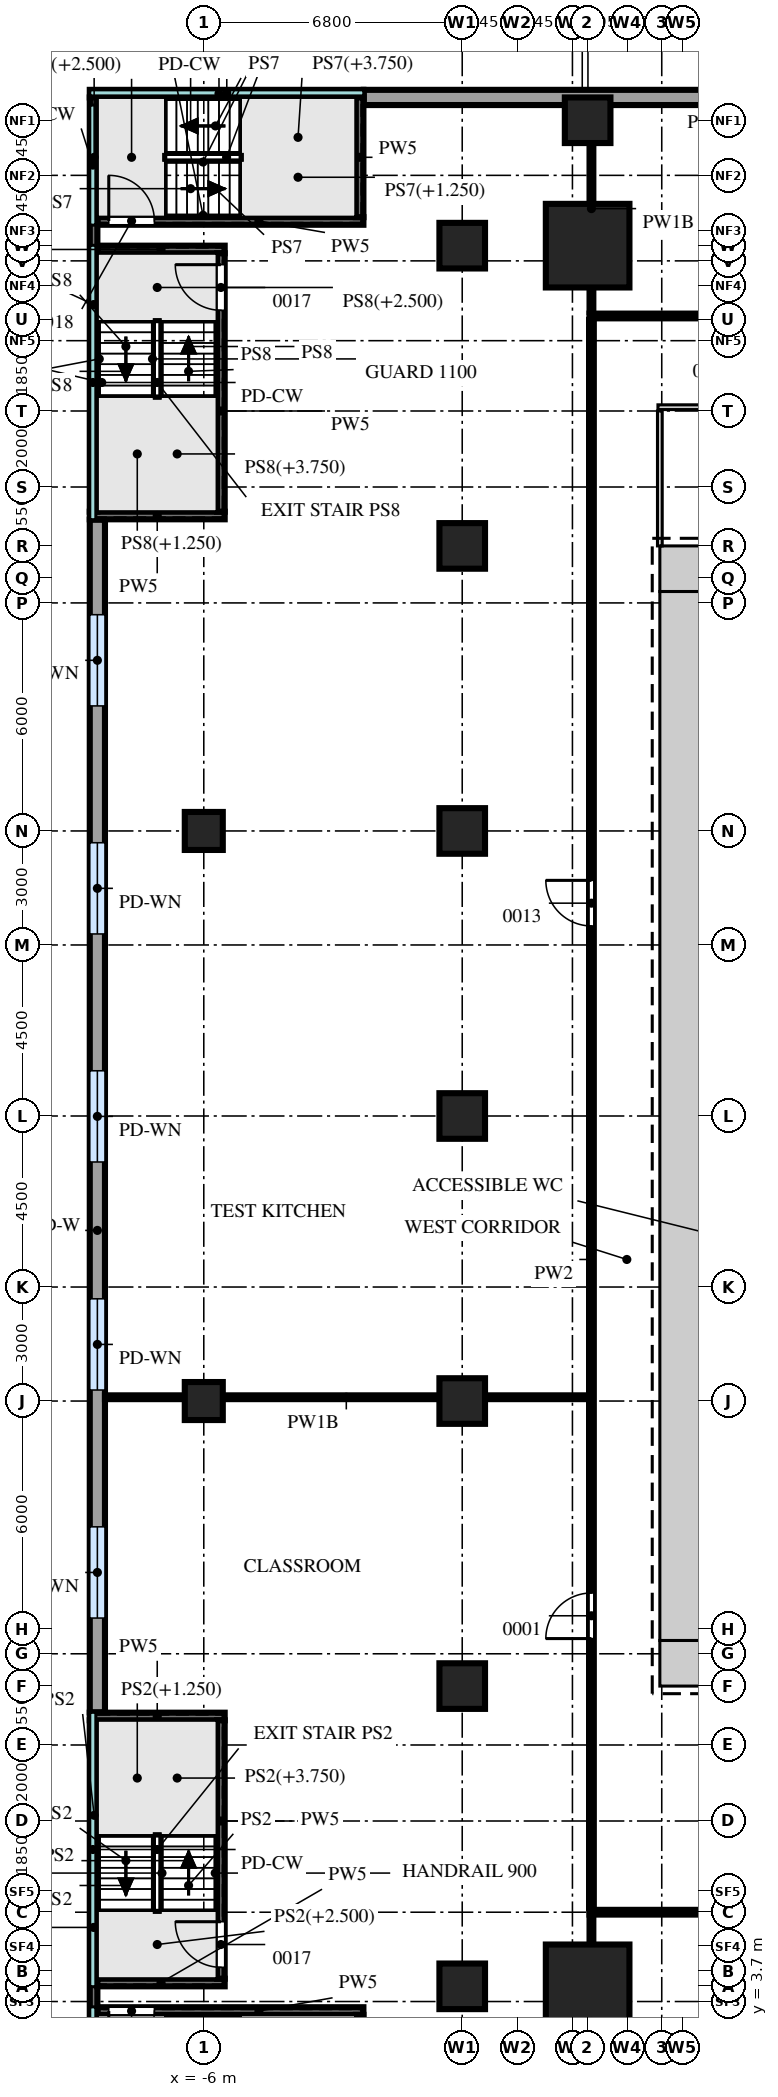
"""IFC4 building model, lengths in metres.
Left out: names, types, materials, properties, quantities, classifications, styles, units other than length and angle.
Written with IfcOpenShell. Run it as: python <this file> out.ifc"""

import sys

from ifc_helpers import new_model, si_unit, direction, frame, frame_2d, origin, origin_2d, place, context, subcontext, project, spatial, rectangle, extrude, source, transform, mapped, element, fill, save


model = new_model("IFC4")
c1 = context("Model", 3, precision=1e-05, world=origin(), true_north=direction((0.0, 1.0)))
c2 = subcontext(c1, "Body", "Model", "MODEL_VIEW")
j1 = project(units=[si_unit("LENGTHUNIT", "METRE"), si_unit("PLANEANGLEUNIT", "RADIAN")], contexts=[c1])
p1 = place(None, origin())
s1 = spatial("IfcSite", under=j1, at=p1, CompositionType="ELEMENT")
p2 = place(p1, origin())
s2 = spatial("IfcBuilding", under=s1, at=p2, CompositionType="ELEMENT")
p3 = place(p2, frame((0.0, 0.0, 23.5)))
s3 = spatial("IfcBuildingStorey", under=s2, at=p3, CompositionType="ELEMENT", Elevation=23.5)
m1 = source(origin(), c2, "Body", "SweptSolid", [
    extrude(rectangle(XDim=1.2, YDim=1.2, at=frame_2d((0.6, 0.0))), origin(), (0.0, 0.0, 1.0), 4.7),
])
for number, where, z_axis, x_axis in (
    (1, (6.0, 41.4, 0.0), (0.0, 0.0, 1.0), (1.0, 0.0, 0.0)),
    (2, (6.0, 12.6, 0.0), (0.0, 0.0, 1.0), (1.0, 0.0, 0.0)),
):
    element("IfcWall", number, at=place(p3, frame(where, z_axis=z_axis, x_axis=x_axis)), inside=s3, PredefinedType="SHEAR", context=c2, shape_type="MappedRepresentation", body=[
        mapped(m1, transform((0.0, 0.0, 0.0))),
    ])
m2 = source(origin(), c2, "Body", "SweptSolid", [
    extrude(rectangle(XDim=27.6, YDim=1.2, at=frame_2d((13.8, 0.0))), origin(), (0.0, 0.0, 1.0), 4.7),
])
p4 = place(p3, frame((6.6, 13.2, 0.0), z_axis=(0.0, 0.0, 1.0), x_axis=(0.0, 1.0, 0.0)))
e3 = element("IfcWall", 3, at=p4, inside=s3, PredefinedType="SHEAR", context=c2, shape_type="MappedRepresentation", body=[
    mapped(m2, transform((0.0, 0.0, 0.0))),
])
m3 = source(origin(), c2, "Body", "SweptSolid", [
    extrude(rectangle(XDim=2.2, YDim=2.2, at=origin_2d()), origin(), (0.0, 0.0, 1.0), 4.7),
])
for number, where, z_axis, x_axis in (
    (4, (4.1, 49.9, 0.0), (0.0, 0.0, 1.0), (1.0, 0.0, 0.0)),
    (5, (4.1, 4.1, 0.0), (0.0, 0.0, 1.0), (1.0, 0.0, 0.0)),
):
    element("IfcColumn", number, at=place(p3, frame(where, z_axis=z_axis, x_axis=x_axis)), inside=s3, PredefinedType="COLUMN", context=c2, shape_type="MappedRepresentation", body=[
        mapped(m3, transform((0.0, 0.0, 0.0))),
    ])
m4 = source(origin(), c2, "Body", "SweptSolid", [
    extrude(rectangle(XDim=1.2, YDim=1.2, at=origin_2d()), origin(), (0.0, 0.0, 1.0), 4.7),
])
for number, where, z_axis, x_axis in (
    (6, (4.1, 53.2, 0.0), (0.0, 0.0, 1.0), (1.0, 0.0, 0.0)),
    (7, (0.8, 4.1, 0.0), (0.0, 0.0, 1.0), (1.0, 0.0, 0.0)),
    (8, (0.8, 12.0, 0.0), (0.0, 0.0, 1.0), (1.0, 0.0, 0.0)),
    (9, (0.8, 19.5, 0.0), (0.0, 0.0, 1.0), (1.0, 0.0, 0.0)),
    (10, (0.8, 27.0, 0.0), (0.0, 0.0, 1.0), (1.0, 0.0, 0.0)),
    (11, (0.8, 34.5, 0.0), (0.0, 0.0, 1.0), (1.0, 0.0, 0.0)),
    (12, (0.8, 42.0, 0.0), (0.0, 0.0, 1.0), (1.0, 0.0, 0.0)),
    (13, (0.8, 49.9, 0.0), (0.0, 0.0, 1.0), (1.0, 0.0, 0.0)),
):
    element("IfcColumn", number, at=place(p3, frame(where, z_axis=z_axis, x_axis=x_axis)), inside=s3, PredefinedType="COLUMN", context=c2, shape_type="MappedRepresentation", body=[
        mapped(m4, transform((0.0, 0.0, 0.0))),
    ])
m5 = source(origin(), c2, "Body", "SweptSolid", [
    extrude(rectangle(XDim=1.0, YDim=1.0, at=origin_2d()), origin(), (0.0, 0.0, 1.0), 4.7),
])
for number, where, z_axis, x_axis in (
    (14, (-6.0, 19.5, 0.0), (0.0, 0.0, 1.0), (1.0, 0.0, 0.0)),
    (15, (-6.0, 34.5, 0.0), (0.0, 0.0, 1.0), (1.0, 0.0, 0.0)),
):
    element("IfcColumn", number, at=place(p3, frame(where, z_axis=z_axis, x_axis=x_axis)), inside=s3, PredefinedType="COLUMN", context=c2, shape_type="MappedRepresentation", body=[
        mapped(m5, transform((0.0, 0.0, 0.0))),
    ])
m6 = source(origin(), c2, "Body", "SweptSolid", [
    extrude(rectangle(XDim=31.38, YDim=0.4, at=frame_2d((15.69, 0.0))), origin(), (0.0, 0.0, 1.0), 4.7),
])
p5 = place(p3, frame((-8.8, 42.69, 0.0), z_axis=(0.0, 0.0, 1.0), x_axis=(0.0, -1.0, 0.0)))
e16 = element("IfcWall", 16, at=p5, inside=s3, PredefinedType="SOLIDWALL", context=c2, shape_type="MappedRepresentation", body=[
    mapped(m6, transform((0.0, 0.0, 0.0))),
])
m7 = source(origin(), c2, "Body", "SweptSolid", [
    extrude(rectangle(XDim=2.4, YDim=2.4, at=frame_2d((1.2, 1.2))), frame((0.0, 0.21, 0.0), z_axis=(0.0, -1.0, 0.0), x_axis=(1.0, 0.0, 0.0)), (0.0, 0.0, 1.0), 0.42),
])
p6 = place(p5, frame((2.5, 0.0, 1.0)))
e17 = element("IfcOpeningElement", 17, at=p6, cuts=e16, PredefinedType="OPENING", context=c2, shape_type="MappedRepresentation", body=[
    mapped(m7, transform((0.0, 0.0, 0.0))),
])
p7 = place(p5, frame((8.5, 0.0, 1.0)))
e18 = element("IfcOpeningElement", 18, at=p7, cuts=e16, PredefinedType="OPENING", context=c2, shape_type="MappedRepresentation", body=[
    mapped(m7, transform((0.0, 0.0, 0.0))),
])
p8 = place(p5, frame((14.5, 0.0, 1.0)))
e19 = element("IfcOpeningElement", 19, at=p8, cuts=e16, PredefinedType="OPENING", context=c2, shape_type="MappedRepresentation", body=[
    mapped(m7, transform((0.0, 0.0, 0.0))),
])
p9 = place(p5, frame((20.5, 0.0, 1.0)))
e20 = element("IfcOpeningElement", 20, at=p9, cuts=e16, PredefinedType="OPENING", context=c2, shape_type="MappedRepresentation", body=[
    mapped(m7, transform((0.0, 0.0, 0.0))),
])
p10 = place(p5, frame((26.5, 0.0, 1.0)))
e21 = element("IfcOpeningElement", 21, at=p10, cuts=e16, PredefinedType="OPENING", context=c2, shape_type="MappedRepresentation", body=[
    mapped(m7, transform((0.0, 0.0, 0.0))),
])
m8 = source(origin(), c2, "Body", "SweptSolid", [
    extrude(rectangle(XDim=32.64, YDim=0.4, at=frame_2d((16.32, 0.0))), origin(), (0.0, 0.0, 1.0), 4.7),
])
p11 = place(p3, frame((30.85, 53.8, 0.0), z_axis=(0.0, 0.0, 1.0), x_axis=(-1.0, 0.0, 0.0)))
e22 = element("IfcWall", 22, at=p11, inside=s3, PredefinedType="SOLIDWALL", context=c2, shape_type="MappedRepresentation", body=[
    mapped(m8, transform((0.0, 0.0, 0.0))),
])
p12 = place(p11, frame((15.1, 0.0, 1.0)))
e23 = element("IfcOpeningElement", 23, at=p12, cuts=e22, PredefinedType="OPENING", context=c2, shape_type="MappedRepresentation", body=[
    mapped(m7, transform((0.0, 0.0, 0.0))),
])
p13 = place(p11, frame((21.1, 0.0, 1.0)))
e24 = element("IfcOpeningElement", 24, at=p13, cuts=e22, PredefinedType="OPENING", context=c2, shape_type="MappedRepresentation", body=[
    mapped(m7, transform((0.0, 0.0, 0.0))),
])
m9 = source(origin(), c2, "Body", "SweptSolid", [
    extrude(rectangle(XDim=7.0, YDim=0.2, at=frame_2d((3.5, 0.0))), origin(), (0.0, 0.0, 1.0), 4.7),
])
p14 = place(p3, frame((-8.8, 3.45, 0.0), z_axis=(0.0, 0.0, 1.0), x_axis=(1.0, 0.0, 0.0)))
e25 = element("IfcWall", 25, at=p14, inside=s3, PredefinedType="PARTITIONING", context=c2, shape_type="MappedRepresentation", body=[
    mapped(m9, transform((0.0, 0.0, 0.0))),
])
m10 = source(origin(), c2, "Body", "SweptSolid", [
    extrude(rectangle(XDim=1.2, YDim=2.1, at=frame_2d((0.6, 1.05))), frame((0.0, 0.11, 0.0), z_axis=(0.0, -1.0, 0.0), x_axis=(1.0, 0.0, 0.0)), (0.0, 0.0, 1.0), 0.22),
])
p15 = place(p14, frame((0.3, 0.0, 0.0)))
e26 = element("IfcOpeningElement", 26, at=p15, cuts=e25, PredefinedType="OPENING", context=c2, shape_type="MappedRepresentation", body=[
    mapped(m10, transform((0.0, 0.0, 0.0))),
])
m11 = source(origin(), c2, "Body", "SweptSolid", [
    extrude(rectangle(XDim=10.9, YDim=0.2, at=frame_2d((5.45, 0.0))), origin(), (0.0, 0.0, 1.0), 4.7),
])
p16 = place(p3, frame((-8.9, 0.2, 0.0), z_axis=(0.0, 0.0, 1.0), x_axis=(0.0, 1.0, 0.0)))
e27 = element("IfcWall", 27, at=p16, inside=s3, PredefinedType="PARTITIONING", context=c2, shape_type="MappedRepresentation", body=[
    mapped(m11, transform((0.0, 0.0, 0.0))),
])
m12 = source(origin(), c2, "Body", "SweptSolid", [
    extrude(rectangle(XDim=3.15, YDim=0.2, at=frame_2d((1.575, 0.0))), origin(), (0.0, 0.0, 1.0), 4.7),
])
p17 = place(p3, frame((-1.9, 0.2, 0.0), z_axis=(0.0, 0.0, 1.0), x_axis=(0.0, 1.0, 0.0)))
e28 = element("IfcWall", 28, at=p17, inside=s3, PredefinedType="PARTITIONING", context=c2, shape_type="MappedRepresentation", body=[
    mapped(m12, transform((0.0, 0.0, 0.0))),
])
m13 = source(origin(), c2, "Body", "SweptSolid", [
    extrude(rectangle(XDim=3.35, YDim=0.2, at=frame_2d((1.675, 0.0))), origin(), (0.0, 0.0, 1.0), 4.7),
])
p18 = place(p3, frame((-8.8, 4.2, 0.0), z_axis=(0.0, 0.0, 1.0), x_axis=(1.0, 0.0, 0.0)))
e29 = element("IfcWall", 29, at=p18, inside=s3, PredefinedType="PARTITIONING", context=c2, shape_type="MappedRepresentation", body=[
    mapped(m13, transform((0.0, 0.0, 0.0))),
])
m14 = source(origin(), c2, "Body", "SweptSolid", [
    extrude(rectangle(XDim=3.55, YDim=0.2, at=frame_2d((1.775, 0.0))), origin(), (0.0, 0.0, 1.0), 4.7),
])
p19 = place(p3, frame((-9.0, 11.2, 0.0), z_axis=(0.0, 0.0, 1.0), x_axis=(1.0, 0.0, 0.0)))
e30 = element("IfcWall", 30, at=p19, inside=s3, PredefinedType="PARTITIONING", context=c2, shape_type="MappedRepresentation", body=[
    mapped(m14, transform((0.0, 0.0, 0.0))),
])
m15 = source(origin(), c2, "Body", "SweptSolid", [
    extrude(rectangle(XDim=6.8, YDim=0.2, at=frame_2d((3.4, 0.0))), origin(), (0.0, 0.0, 1.0), 4.7),
])
p20 = place(p3, frame((-5.55, 4.3, 0.0), z_axis=(0.0, 0.0, 1.0), x_axis=(0.0, 1.0, 0.0)))
e31 = element("IfcWall", 31, at=p20, inside=s3, PredefinedType="PARTITIONING", context=c2, shape_type="MappedRepresentation", body=[
    mapped(m15, transform((0.0, 0.0, 0.0))),
])
p21 = place(p20, frame((0.3, 0.0, 0.0)))
e32 = element("IfcOpeningElement", 32, at=p21, cuts=e31, PredefinedType="OPENING", context=c2, shape_type="MappedRepresentation", body=[
    mapped(m10, transform((0.0, 0.0, 0.0))),
])
p22 = place(p3, frame((-8.8, 50.55, 0.0), z_axis=(0.0, 0.0, 1.0), x_axis=(1.0, 0.0, 0.0)))
e33 = element("IfcWall", 33, at=p22, inside=s3, PredefinedType="PARTITIONING", context=c2, shape_type="MappedRepresentation", body=[
    mapped(m9, transform((0.0, 0.0, 0.0))),
])
p23 = place(p22, frame((0.3, 0.0, 0.0)))
e34 = element("IfcOpeningElement", 34, at=p23, cuts=e33, PredefinedType="OPENING", context=c2, shape_type="MappedRepresentation", body=[
    mapped(m10, transform((0.0, 0.0, 0.0))),
])
m16 = source(origin(), c2, "Body", "SweptSolid", [
    extrude(rectangle(XDim=7.2, YDim=0.2, at=frame_2d((3.6, 0.0))), origin(), (0.0, 0.0, 1.0), 4.7),
])
p24 = place(p3, frame((-9.0, 53.9, 0.0), z_axis=(0.0, 0.0, 1.0), x_axis=(1.0, 0.0, 0.0)))
e35 = element("IfcWall", 35, at=p24, inside=s3, PredefinedType="PARTITIONING", context=c2, shape_type="MappedRepresentation", body=[
    mapped(m16, transform((0.0, 0.0, 0.0))),
])
p25 = place(p3, frame((-1.9, 50.65, 0.0), z_axis=(0.0, 0.0, 1.0), x_axis=(0.0, 1.0, 0.0)))
e36 = element("IfcWall", 36, at=p25, inside=s3, PredefinedType="PARTITIONING", context=c2, shape_type="MappedRepresentation", body=[
    mapped(m12, transform((0.0, 0.0, 0.0))),
])
p26 = place(p3, frame((-9.0, 42.8, 0.0), z_axis=(0.0, 0.0, 1.0), x_axis=(1.0, 0.0, 0.0)))
e37 = element("IfcWall", 37, at=p26, inside=s3, PredefinedType="PARTITIONING", context=c2, shape_type="MappedRepresentation", body=[
    mapped(m14, transform((0.0, 0.0, 0.0))),
])
p27 = place(p3, frame((-8.8, 49.8, 0.0), z_axis=(0.0, 0.0, 1.0), x_axis=(1.0, 0.0, 0.0)))
e38 = element("IfcWall", 38, at=p27, inside=s3, PredefinedType="PARTITIONING", context=c2, shape_type="MappedRepresentation", body=[
    mapped(m13, transform((0.0, 0.0, 0.0))),
])
p28 = place(p3, frame((-8.9, 42.9, 0.0), z_axis=(0.0, 0.0, 1.0), x_axis=(0.0, 1.0, 0.0)))
e39 = element("IfcWall", 39, at=p28, inside=s3, PredefinedType="PARTITIONING", context=c2, shape_type="MappedRepresentation", body=[
    mapped(m11, transform((0.0, 0.0, 0.0))),
])
p29 = place(p3, frame((-5.55, 42.9, 0.0), z_axis=(0.0, 0.0, 1.0), x_axis=(0.0, 1.0, 0.0)))
e40 = element("IfcWall", 40, at=p29, inside=s3, PredefinedType="PARTITIONING", context=c2, shape_type="MappedRepresentation", body=[
    mapped(m15, transform((0.0, 0.0, 0.0))),
])
p30 = place(p29, frame((5.3, 0.0, 0.0)))
e41 = element("IfcOpeningElement", 41, at=p30, cuts=e40, PredefinedType="OPENING", context=c2, shape_type="MappedRepresentation", body=[
    mapped(m10, transform((0.0, 0.0, 0.0))),
])
m17 = source(origin(), c2, "Body", "SweptSolid", [
    extrude(rectangle(XDim=5.55, YDim=0.1, at=frame_2d((2.775, 0.0))), origin(), (0.0, 0.0, 1.0), 4.7),
])
p31 = place(p3, frame((4.2, 0.4, 0.0), z_axis=(0.0, 0.0, 1.0), x_axis=(0.0, 1.0, 0.0)))
e42 = element("IfcWall", 42, at=p31, inside=s3, PredefinedType="PARTITIONING", context=c2, shape_type="MappedRepresentation", body=[
    mapped(m17, transform((0.0, 0.0, 0.0))),
])
m18 = source(origin(), c2, "Body", "SweptSolid", [
    extrude(rectangle(XDim=22.3, YDim=0.125, at=frame_2d((11.15, 0.0))), origin(), (0.0, 0.0, 1.0), 4.7),
])
p32 = place(p3, frame((4.15, 6.05, 0.0), z_axis=(0.0, 0.0, 1.0), x_axis=(1.0, 0.0, 0.0)))
e43 = element("IfcWall", 43, at=p32, inside=s3, PredefinedType="PARTITIONING", context=c2, shape_type="MappedRepresentation", body=[
    mapped(m18, transform((0.0, 0.0, 0.0))),
])
m19 = source(origin(), c2, "Body", "SweptSolid", [
    extrude(rectangle(XDim=1.2, YDim=2.1, at=frame_2d((0.6, 1.05))), frame((0.0, 0.073, 0.0), z_axis=(0.0, -1.0, 0.0), x_axis=(1.0, 0.0, 0.0)), (0.0, 0.0, 1.0), 0.145),
])
p33 = place(p32, frame((9.2, 0.0, 0.0)))
e44 = element("IfcOpeningElement", 44, at=p33, cuts=e43, PredefinedType="OPENING", context=c2, shape_type="MappedRepresentation", body=[
    mapped(m19, transform((0.0, 0.0, 0.0))),
])
m20 = source(origin(), c2, "Body", "SweptSolid", [
    extrude(rectangle(XDim=41.8, YDim=0.125, at=frame_2d((20.9, 0.0))), origin(), (0.0, 0.0, 1.0), 4.7),
])
p34 = place(p3, frame((4.2, 6.15, 0.0), z_axis=(0.0, 0.0, 1.0), x_axis=(0.0, 1.0, 0.0)))
e45 = element("IfcWall", 45, at=p34, inside=s3, PredefinedType="PARTITIONING", context=c2, shape_type="MappedRepresentation", body=[
    mapped(m20, transform((0.0, 0.0, 0.0))),
])
p35 = place(p34, frame((7.1, 0.0, 0.0)))
e46 = element("IfcOpeningElement", 46, at=p35, cuts=e45, PredefinedType="OPENING", context=c2, shape_type="MappedRepresentation", body=[
    mapped(m19, transform((0.0, 0.0, 0.0))),
])
p36 = place(p34, frame((25.85, 0.0, 0.0)))
e47 = element("IfcOpeningElement", 47, at=p36, cuts=e45, PredefinedType="OPENING", context=c2, shape_type="MappedRepresentation", body=[
    mapped(m19, transform((0.0, 0.0, 0.0))),
])
m21 = source(origin(), c2, "Body", "SweptSolid", [
    extrude(rectangle(XDim=12.7, YDim=0.1, at=frame_2d((6.35, 0.0))), origin(), (0.0, 0.0, 1.0), 4.7),
])
p37 = place(p3, frame((-8.6, 19.6, 0.0), z_axis=(0.0, 0.0, 1.0), x_axis=(1.0, 0.0, 0.0)))
e48 = element("IfcWall", 48, at=p37, inside=s3, PredefinedType="PARTITIONING", context=c2, shape_type="MappedRepresentation", body=[
    mapped(m21, transform((0.0, 0.0, 0.0))),
])
m22 = source(origin(), c2, "Body", "SweptSolid", [
    extrude(rectangle(XDim=3.55, YDim=0.125, at=frame_2d((1.775, 0.0))), origin(), (0.0, 0.0, 1.0), 4.7),
])
p38 = place(p3, frame((6.0, 42.0, 0.0), z_axis=(0.0, 0.0, 1.0), x_axis=(0.0, 1.0, 0.0)))
e49 = element("IfcWall", 49, at=p38, inside=s3, PredefinedType="PARTITIONING", context=c2, shape_type="MappedRepresentation", body=[
    mapped(m22, transform((0.0, 0.0, 0.0))),
])
m23 = source(origin(), c2, "Body", "SweptSolid", [
    extrude(rectangle(XDim=7.95, YDim=0.125, at=frame_2d((3.975, 0.0))), origin(), (0.0, 0.0, 1.0), 4.7),
])
p39 = place(p3, frame((5.95, 45.65, 0.0), z_axis=(0.0, 0.0, 1.0), x_axis=(1.0, 0.0, 0.0)))
e50 = element("IfcWall", 50, at=p39, inside=s3, PredefinedType="PARTITIONING", context=c2, shape_type="MappedRepresentation", body=[
    mapped(m23, transform((0.0, 0.0, 0.0))),
])
m24 = source(origin(), c2, "Body", "SweptSolid", [
    extrude(rectangle(XDim=0.9, YDim=2.1, at=frame_2d((0.45, 1.05))), frame((0.0, 0.073, 0.0), z_axis=(0.0, -1.0, 0.0), x_axis=(1.0, 0.0, 0.0)), (0.0, 0.0, 1.0), 0.145),
])
p40 = place(p39, frame((3.55, 0.0, 0.0)))
e51 = element("IfcOpeningElement", 51, at=p40, cuts=e50, PredefinedType="OPENING", context=c2, shape_type="MappedRepresentation", body=[
    mapped(m24, transform((0.0, 0.0, 0.0))),
])
m25 = source(origin(), c2, "Body", "SweptSolid", [
    extrude(rectangle(XDim=26.7, YDim=0.125, at=frame_2d((13.35, 0.0))), origin(), (0.0, 0.0, 1.0), 4.7),
])
p41 = place(p3, frame((4.15, 48.05, 0.0), z_axis=(0.0, 0.0, 1.0), x_axis=(1.0, 0.0, 0.0)))
e52 = element("IfcWall", 52, at=p41, inside=s3, PredefinedType="PARTITIONING", context=c2, shape_type="MappedRepresentation", body=[
    mapped(m25, transform((0.0, 0.0, 0.0))),
])
p42 = place(p41, frame((3.5, 0.0, 0.0)))
e53 = element("IfcOpeningElement", 53, at=p42, cuts=e52, PredefinedType="OPENING", context=c2, shape_type="MappedRepresentation", body=[
    mapped(m24, transform((0.0, 0.0, 0.0))),
])
p43 = place(p41, frame((11.0, 0.0, 0.0)))
e54 = element("IfcOpeningElement", 54, at=p43, cuts=e52, PredefinedType="OPENING", context=c2, shape_type="MappedRepresentation", body=[
    mapped(m24, transform((0.0, 0.0, 0.0))),
])
p44 = place(p41, frame((20.75, 0.0, 0.0)))
e55 = element("IfcOpeningElement", 55, at=p44, cuts=e52, PredefinedType="OPENING", context=c2, shape_type="MappedRepresentation", body=[
    mapped(m24, transform((0.0, 0.0, 0.0))),
])
m26 = source(origin(), c2, "Body", "SweptSolid", [
    extrude(rectangle(XDim=5.45, YDim=0.1, at=frame_2d((2.725, 0.0))), origin(), (0.0, 0.0, 1.0), 4.7),
])
p45 = place(p3, frame((4.2, 48.15, 0.0), z_axis=(0.0, 0.0, 1.0), x_axis=(0.0, 1.0, 0.0)))
e56 = element("IfcWall", 56, at=p45, inside=s3, PredefinedType="PARTITIONING", context=c2, shape_type="MappedRepresentation", body=[
    mapped(m26, transform((0.0, 0.0, 0.0))),
])
m27 = source(origin(), c2, "Body", "SweptSolid", [
    extrude(rectangle(XDim=2.4, YDim=2.4, at=frame_2d((1.2, 1.2))), frame((0.0, 0.03, 0.0), z_axis=(0.0, -1.0, 0.0), x_axis=(1.0, 0.0, 0.0)), (0.0, 0.0, 1.0), 0.06),
])
p46 = place(p6, origin())
e57 = element("IfcWindow", 57, at=p46, inside=s3, PartitioningType="SINGLE_PANEL", PredefinedType="WINDOW", context=c2, shape_type="MappedRepresentation", body=[
    mapped(m27, transform((0.0, 0.0, 0.0))),
])
fill(e17, e57)
p47 = place(p7, origin())
e58 = element("IfcWindow", 58, at=p47, inside=s3, PartitioningType="SINGLE_PANEL", PredefinedType="WINDOW", context=c2, shape_type="MappedRepresentation", body=[
    mapped(m27, transform((0.0, 0.0, 0.0))),
])
fill(e18, e58)
p48 = place(p8, origin())
e59 = element("IfcWindow", 59, at=p48, inside=s3, PartitioningType="SINGLE_PANEL", PredefinedType="WINDOW", context=c2, shape_type="MappedRepresentation", body=[
    mapped(m27, transform((0.0, 0.0, 0.0))),
])
fill(e19, e59)
p49 = place(p9, origin())
e60 = element("IfcWindow", 60, at=p49, inside=s3, PartitioningType="SINGLE_PANEL", PredefinedType="WINDOW", context=c2, shape_type="MappedRepresentation", body=[
    mapped(m27, transform((0.0, 0.0, 0.0))),
])
fill(e20, e60)
p50 = place(p10, origin())
e61 = element("IfcWindow", 61, at=p50, inside=s3, PartitioningType="SINGLE_PANEL", PredefinedType="WINDOW", context=c2, shape_type="MappedRepresentation", body=[
    mapped(m27, transform((0.0, 0.0, 0.0))),
])
fill(e21, e61)
m28 = source(origin(), c2, "Body", "SweptSolid", [
    extrude(rectangle(XDim=1.2, YDim=2.1, at=frame_2d((0.6, 1.05))), frame((0.0, 0.025, 0.0), z_axis=(0.0, -1.0, 0.0), x_axis=(1.0, 0.0, 0.0)), (0.0, 0.0, 1.0), 0.05),
])
p51 = place(p35, origin())
e62 = element("IfcDoor", 62, at=p51, inside=s3, OperationType="SINGLE_SWING_RIGHT", PredefinedType="DOOR", context=c2, shape_type="MappedRepresentation", body=[
    mapped(m28, transform((0.0, 0.0, 0.0))),
])
fill(e46, e62)
p52 = place(p36, origin())
e63 = element("IfcDoor", 63, at=p52, inside=s3, OperationType="SINGLE_SWING_LEFT", PredefinedType="DOOR", context=c2, shape_type="MappedRepresentation", body=[
    mapped(m28, transform((0.0, 0.0, 0.0))),
])
fill(e47, e63)
p53 = place(p15, origin())
e64 = element("IfcDoor", 64, at=p53, inside=s3, OperationType="SINGLE_SWING_LEFT", PredefinedType="DOOR", context=c2, shape_type="MappedRepresentation", body=[
    mapped(m28, transform((0.0, 0.0, 0.0))),
])
fill(e26, e64)
p54 = place(p21, origin())
e65 = element("IfcDoor", 65, at=p54, inside=s3, OperationType="SINGLE_SWING_LEFT", PredefinedType="DOOR", context=c2, shape_type="MappedRepresentation", body=[
    mapped(m28, transform((0.0, 0.0, 0.0))),
])
fill(e32, e65)
p55 = place(p23, origin())
e66 = element("IfcDoor", 66, at=p55, inside=s3, OperationType="SINGLE_SWING_RIGHT", PredefinedType="DOOR", context=c2, shape_type="MappedRepresentation", body=[
    mapped(m28, transform((0.0, 0.0, 0.0))),
])
fill(e34, e66)
p56 = place(p30, origin())
e67 = element("IfcDoor", 67, at=p56, inside=s3, OperationType="SINGLE_SWING_LEFT", PredefinedType="DOOR", context=c2, shape_type="MappedRepresentation", body=[
    mapped(m28, transform((0.0, 0.0, 0.0))),
])
fill(e41, e67)
save(model, sys.argv[1])
